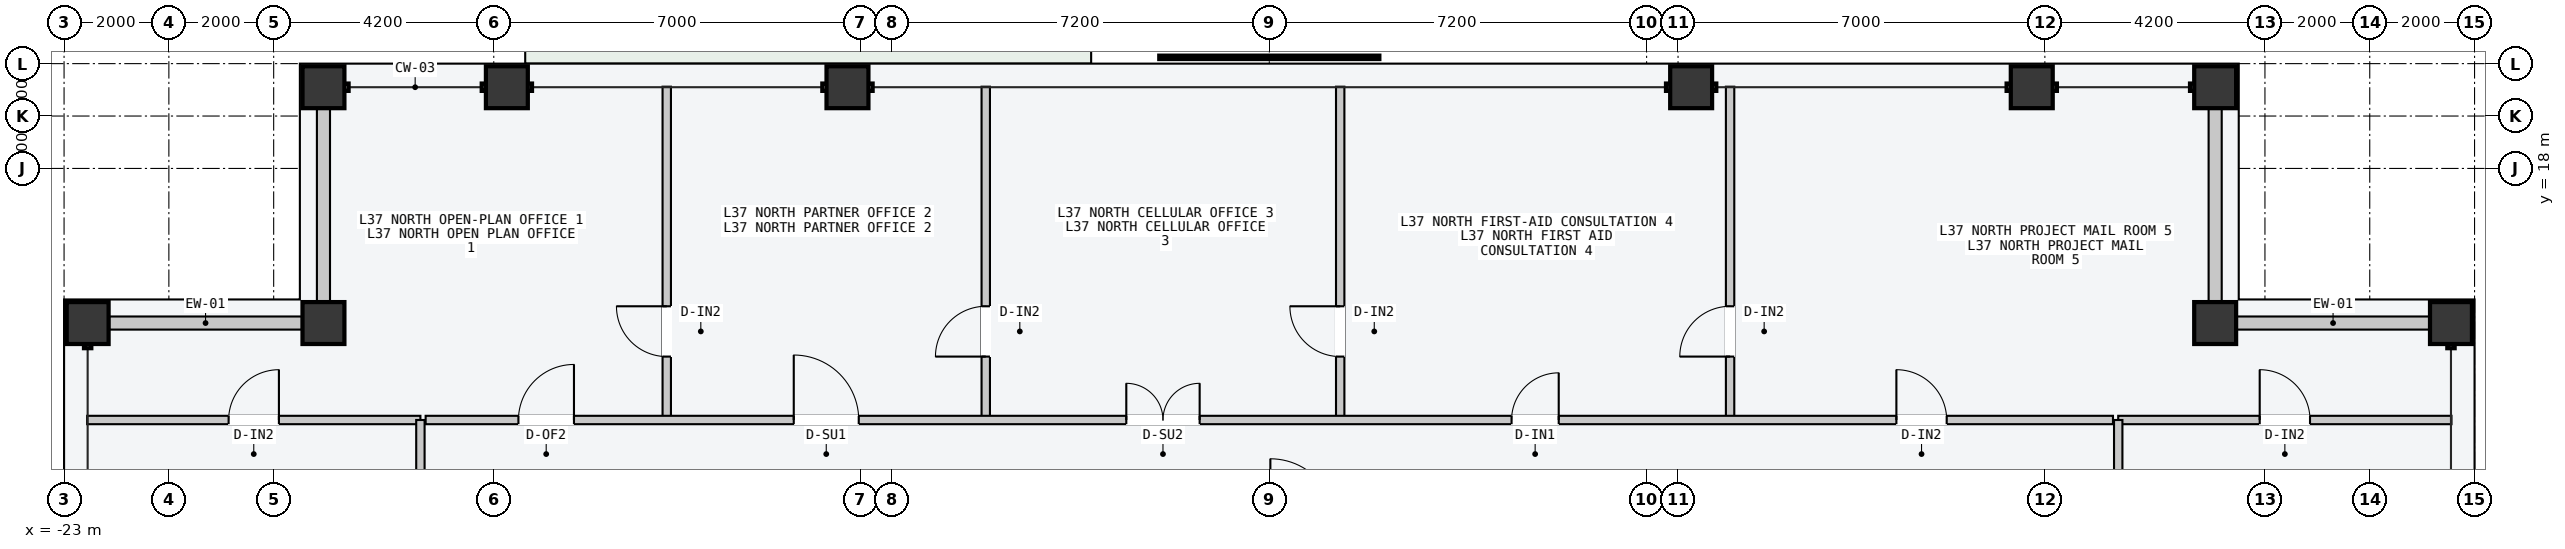
"""IFC4 building model, lengths in metres.
Left out: names, types, materials, properties, quantities, classifications, styles, units other than length and angle.
Written with IfcOpenShell. Run it as: python <this file> out.ifc"""

import sys

from ifc_helpers import new_model, si_unit, direction, frame, frame_2d, origin, origin_2d, place, context, subcontext, project, spatial, rectangle, hollow_rectangle, extrude, element, fill, save


model = new_model("IFC4")
c1 = context("Model", 3, precision=1e-05, world=origin(), true_north=direction((0.0, 1.0)))
c2 = subcontext(c1, "Body", "Model", "MODEL_VIEW")
j1 = project(units=[si_unit("LENGTHUNIT", "METRE"), si_unit("PLANEANGLEUNIT", "RADIAN")], contexts=[c1])
p1 = place(None, origin())
s1 = spatial("IfcSite", under=j1, at=p1, CompositionType="ELEMENT")
p2 = place(p1, origin())
s2 = spatial("IfcBuilding", under=s1, at=p2, CompositionType="ELEMENT")
p3 = place(p2, frame((0.0, 0.0, 142.2)))
s3 = spatial("IfcBuildingStorey", under=s2, at=p3, CompositionType="ELEMENT", Elevation=142.2)
for number, where, z_axis, x_axis in (
    (1, (-18.05, 19.55, 0.0), (0.0, 0.0, 1.0), (1.0, 0.0, 0.0)),
    (2, (-14.55, 19.55, 0.0), (0.0, 0.0, 1.0), (1.0, 0.0, 0.0)),
    (3, (-8.05, 19.55, 0.0), (0.0, 0.0, 1.0), (1.0, 0.0, 0.0)),
    (4, (8.05, 19.55, 0.0), (0.0, 0.0, 1.0), (1.0, 0.0, 0.0)),
    (5, (14.55, 19.55, 0.0), (0.0, 0.0, 1.0), (1.0, 0.0, 0.0)),
    (6, (18.05, 19.55, 0.0), (0.0, 0.0, 1.0), (1.0, 0.0, 0.0)),
    (7, (-22.55, 15.05, 0.0), (0.0, 0.0, 1.0), (0.0, 1.0, 0.0)),
    (8, (22.55, 15.05, 0.0), (0.0, 0.0, 1.0), (0.0, 1.0, 0.0)),
    (9, (-18.05, 15.05, 0.0), (0.0, 0.0, 1.0), (1.0, 0.0, 0.0)),
    (10, (18.05, 15.05, 0.0), (0.0, 0.0, 1.0), (1.0, 0.0, 0.0)),
):
    element("IfcColumn", number, at=place(p3, frame(where, z_axis=z_axis, x_axis=x_axis)), inside=s3, PredefinedType="COLUMN", context=c2, shape_type="SweptSolid", body=[
        extrude(hollow_rectangle(XDim=0.8, YDim=0.8, WallThickness=0.036, at=origin_2d()), origin(), (0.0, 0.0, 1.0), 3.6),
    ])
for number, where, z_axis, x_axis in (
    (11, (-22.14, 15.05, 0.0), (0.0, 0.0, 1.0), (1.0, 0.0, 0.0)),
    (12, (-18.05, 15.46, 0.0), (0.0, 0.0, 1.0), (0.0, 1.0, 0.0)),
    (13, (18.46, 15.05, 0.0), (0.0, 0.0, 1.0), (1.0, 0.0, 0.0)),
    (14, (18.05, 15.46, 0.0), (0.0, 0.0, 1.0), (0.0, 1.0, 0.0)),
):
    element("IfcWall", number, at=place(p3, frame(where, z_axis=z_axis, x_axis=x_axis)), inside=s3, PredefinedType="STANDARD", context=c2, shape_type="SweptSolid", body=[
        extrude(rectangle(XDim=3.68, YDim=0.25, at=frame_2d((1.84, 0.0))), origin(), (0.0, 0.0, 1.0), 2.75),
    ])
p4 = place(p3, frame((-11.499, 13.26, 0.0), z_axis=(0.0, 0.0, 1.0), x_axis=(0.0, 1.0, 0.0)))
e15 = element("IfcWall", 15, at=p4, inside=s3, PredefinedType="PARTITIONING", context=c2, shape_type="SweptSolid", body=[
    extrude(rectangle(XDim=6.3, YDim=0.16, at=frame_2d((3.15, 0.0))), origin(), (0.0, 0.0, 1.0), 3.4),
])
p5 = place(p4, frame((1.15, 0.0, 0.0)))
e16 = element("IfcOpeningElement", 16, at=p5, cuts=e15, PredefinedType="OPENING", context=c2, shape_type="SweptSolid", body=[
    extrude(rectangle(XDim=0.96, YDim=2.18, at=frame_2d((0.48, 1.09))), frame((0.0, 0.09, 0.0), z_axis=(0.0, -1.0, 0.0), x_axis=(1.0, 0.0, 0.0)), (0.0, 0.0, 1.0), 0.18),
])
p6 = place(p3, frame((-5.411, 13.26, 0.0), z_axis=(0.0, 0.0, 1.0), x_axis=(0.0, 1.0, 0.0)))
e17 = element("IfcWall", 17, at=p6, inside=s3, PredefinedType="PARTITIONING", context=c2, shape_type="SweptSolid", body=[
    extrude(rectangle(XDim=6.3, YDim=0.16, at=frame_2d((3.15, 0.0))), origin(), (0.0, 0.0, 1.0), 3.4),
])
p7 = place(p6, frame((1.15, 0.0, 0.0)))
e18 = element("IfcOpeningElement", 18, at=p7, cuts=e17, PredefinedType="OPENING", context=c2, shape_type="SweptSolid", body=[
    extrude(rectangle(XDim=0.96, YDim=2.18, at=frame_2d((0.48, 1.09))), frame((0.0, 0.09, 0.0), z_axis=(0.0, -1.0, 0.0), x_axis=(1.0, 0.0, 0.0)), (0.0, 0.0, 1.0), 0.18),
])
p8 = place(p3, frame((1.353, 13.26, 0.0), z_axis=(0.0, 0.0, 1.0), x_axis=(0.0, 1.0, 0.0)))
e19 = element("IfcWall", 19, at=p8, inside=s3, PredefinedType="PARTITIONING", context=c2, shape_type="SweptSolid", body=[
    extrude(rectangle(XDim=6.3, YDim=0.16, at=frame_2d((3.15, 0.0))), origin(), (0.0, 0.0, 1.0), 3.4),
])
p9 = place(p8, frame((1.15, 0.0, 0.0)))
e20 = element("IfcOpeningElement", 20, at=p9, cuts=e19, PredefinedType="OPENING", context=c2, shape_type="SweptSolid", body=[
    extrude(rectangle(XDim=0.96, YDim=2.18, at=frame_2d((0.48, 1.09))), frame((0.0, 0.09, 0.0), z_axis=(0.0, -1.0, 0.0), x_axis=(1.0, 0.0, 0.0)), (0.0, 0.0, 1.0), 0.18),
])
p10 = place(p3, frame((8.793, 13.26, 0.0), z_axis=(0.0, 0.0, 1.0), x_axis=(0.0, 1.0, 0.0)))
e21 = element("IfcWall", 21, at=p10, inside=s3, PredefinedType="PARTITIONING", context=c2, shape_type="SweptSolid", body=[
    extrude(rectangle(XDim=6.3, YDim=0.16, at=frame_2d((3.15, 0.0))), origin(), (0.0, 0.0, 1.0), 3.4),
])
p11 = place(p10, frame((1.15, 0.0, 0.0)))
e22 = element("IfcOpeningElement", 22, at=p11, cuts=e21, PredefinedType="OPENING", context=c2, shape_type="SweptSolid", body=[
    extrude(rectangle(XDim=0.96, YDim=2.18, at=frame_2d((0.48, 1.09))), frame((0.0, 0.09, 0.0), z_axis=(0.0, -1.0, 0.0), x_axis=(1.0, 0.0, 0.0)), (0.0, 0.0, 1.0), 0.18),
])
p12 = place(p3, frame((-16.1, 13.2, 0.0), z_axis=(0.0, 0.0, 1.0), x_axis=(1.0, 0.0, 0.0)))
e23 = element("IfcWall", 23, at=p12, inside=s3, PredefinedType="PARTITIONING", context=c2, shape_type="SweptSolid", body=[
    extrude(rectangle(XDim=32.2, YDim=0.16, at=frame_2d((16.1, 0.0))), origin(), (0.0, 0.0, 1.0), 3.4),
])
p13 = place(p12, frame((1.771, 0.0, 0.0)))
e24 = element("IfcOpeningElement", 24, at=p13, cuts=e23, PredefinedType="OPENING", context=c2, shape_type="SweptSolid", body=[
    extrude(rectangle(XDim=1.06, YDim=2.2, at=frame_2d((0.53, 1.1))), frame((0.0, 0.09, 0.0), z_axis=(0.0, -1.0, 0.0), x_axis=(1.0, 0.0, 0.0)), (0.0, 0.0, 1.0), 0.18),
])
p14 = place(p12, frame((7.025, 0.0, 0.0)))
e25 = element("IfcOpeningElement", 25, at=p14, cuts=e23, PredefinedType="OPENING", context=c2, shape_type="SweptSolid", body=[
    extrude(rectangle(XDim=1.24, YDim=2.24, at=frame_2d((0.62, 1.12))), frame((0.0, 0.09, 0.0), z_axis=(0.0, -1.0, 0.0), x_axis=(1.0, 0.0, 0.0)), (0.0, 0.0, 1.0), 0.18),
])
p15 = place(p12, frame((13.371, 0.0, 0.0)))
e26 = element("IfcOpeningElement", 26, at=p15, cuts=e23, PredefinedType="OPENING", context=c2, shape_type="SweptSolid", body=[
    extrude(rectangle(XDim=1.4, YDim=2.2, at=frame_2d((0.7, 1.1))), frame((0.0, 0.09, 0.0), z_axis=(0.0, -1.0, 0.0), x_axis=(1.0, 0.0, 0.0)), (0.0, 0.0, 1.0), 0.18),
])
p16 = place(p12, frame((20.723, 0.0, 0.0)))
e27 = element("IfcOpeningElement", 27, at=p16, cuts=e23, PredefinedType="OPENING", context=c2, shape_type="SweptSolid", body=[
    extrude(rectangle(XDim=0.9, YDim=2.15, at=frame_2d((0.45, 1.075))), frame((0.0, 0.09, 0.0), z_axis=(0.0, -1.0, 0.0), x_axis=(1.0, 0.0, 0.0)), (0.0, 0.0, 1.0), 0.18),
])
p17 = place(p12, frame((28.067, 0.0, 0.0)))
e28 = element("IfcOpeningElement", 28, at=p17, cuts=e23, PredefinedType="OPENING", context=c2, shape_type="SweptSolid", body=[
    extrude(rectangle(XDim=0.96, YDim=2.18, at=frame_2d((0.48, 1.09))), frame((0.0, 0.09, 0.0), z_axis=(0.0, -1.0, 0.0), x_axis=(1.0, 0.0, 0.0)), (0.0, 0.0, 1.0), 0.18),
])
p18 = place(p3, frame((-22.56, 13.2, 0.0), z_axis=(0.0, 0.0, 1.0), x_axis=(1.0, 0.0, 0.0)))
e29 = element("IfcWall", 29, at=p18, inside=s3, PredefinedType="PARTITIONING", context=c2, shape_type="SweptSolid", body=[
    extrude(rectangle(XDim=6.36, YDim=0.16, at=frame_2d((3.18, 0.0))), origin(), (0.0, 0.0, 1.0), 3.4),
])
p19 = place(p18, frame((2.7, 0.0, 0.0)))
e30 = element("IfcOpeningElement", 30, at=p19, cuts=e29, PredefinedType="OPENING", context=c2, shape_type="SweptSolid", body=[
    extrude(rectangle(XDim=0.96, YDim=2.18, at=frame_2d((0.48, 1.09))), frame((0.0, 0.09, 0.0), z_axis=(0.0, -1.0, 0.0), x_axis=(1.0, 0.0, 0.0)), (0.0, 0.0, 1.0), 0.18),
])
p20 = place(p3, frame((16.2, 13.2, 0.0), z_axis=(0.0, 0.0, 1.0), x_axis=(1.0, 0.0, 0.0)))
e31 = element("IfcWall", 31, at=p20, inside=s3, PredefinedType="PARTITIONING", context=c2, shape_type="SweptSolid", body=[
    extrude(rectangle(XDim=6.36, YDim=0.16, at=frame_2d((3.18, 0.0))), origin(), (0.0, 0.0, 1.0), 3.4),
])
p21 = place(p20, frame((2.7, 0.0, 0.0)))
e32 = element("IfcOpeningElement", 32, at=p21, cuts=e31, PredefinedType="OPENING", context=c2, shape_type="SweptSolid", body=[
    extrude(rectangle(XDim=0.96, YDim=2.18, at=frame_2d((0.48, 1.09))), frame((0.0, 0.09, 0.0), z_axis=(0.0, -1.0, 0.0), x_axis=(1.0, 0.0, 0.0)), (0.0, 0.0, 1.0), 0.18),
])
for number, where, z_axis, x_axis in (
    (33, (-16.2, 11.25, 0.0), (0.0, 0.0, 1.0), (0.0, 1.0, 0.0)),
    (34, (16.2, 11.25, 0.0), (0.0, 0.0, 1.0), (0.0, 1.0, 0.0)),
):
    element("IfcWall", number, at=place(p3, frame(where, z_axis=z_axis, x_axis=x_axis)), inside=s3, PredefinedType="PARTITIONING", context=c2, shape_type="SweptSolid", body=[
        extrude(rectangle(XDim=1.95, YDim=0.16, at=frame_2d((0.975, 0.0))), origin(), (0.0, 0.0, 1.0), 3.4),
    ])
p22 = place(p5, origin())
e35 = element("IfcDoor", 35, at=p22, inside=s3, OperationType="SINGLE_SWING_RIGHT", PredefinedType="DOOR", context=c2, shape_type="SweptSolid", body=[
    extrude(rectangle(XDim=0.96, YDim=2.18, at=frame_2d((0.48, 1.09))), frame((0.0, 0.025, 0.0), z_axis=(0.0, -1.0, 0.0), x_axis=(1.0, 0.0, 0.0)), (0.0, 0.0, 1.0), 0.05),
])
fill(e16, e35)
p23 = place(p7, origin())
e36 = element("IfcDoor", 36, at=p23, inside=s3, OperationType="SINGLE_SWING_LEFT", PredefinedType="DOOR", context=c2, shape_type="SweptSolid", body=[
    extrude(rectangle(XDim=0.96, YDim=2.18, at=frame_2d((0.48, 1.09))), frame((0.0, 0.025, 0.0), z_axis=(0.0, -1.0, 0.0), x_axis=(1.0, 0.0, 0.0)), (0.0, 0.0, 1.0), 0.05),
])
fill(e18, e36)
p24 = place(p9, origin())
e37 = element("IfcDoor", 37, at=p24, inside=s3, OperationType="SINGLE_SWING_RIGHT", PredefinedType="DOOR", context=c2, shape_type="SweptSolid", body=[
    extrude(rectangle(XDim=0.96, YDim=2.18, at=frame_2d((0.48, 1.09))), frame((0.0, 0.025, 0.0), z_axis=(0.0, -1.0, 0.0), x_axis=(1.0, 0.0, 0.0)), (0.0, 0.0, 1.0), 0.05),
])
fill(e20, e37)
p25 = place(p11, origin())
e38 = element("IfcDoor", 38, at=p25, inside=s3, OperationType="SINGLE_SWING_LEFT", PredefinedType="DOOR", context=c2, shape_type="SweptSolid", body=[
    extrude(rectangle(XDim=0.96, YDim=2.18, at=frame_2d((0.48, 1.09))), frame((0.0, 0.025, 0.0), z_axis=(0.0, -1.0, 0.0), x_axis=(1.0, 0.0, 0.0)), (0.0, 0.0, 1.0), 0.05),
])
fill(e22, e38)
p26 = place(p13, origin())
e39 = element("IfcDoor", 39, at=p26, inside=s3, OperationType="SINGLE_SWING_RIGHT", PredefinedType="DOOR", context=c2, shape_type="SweptSolid", body=[
    extrude(rectangle(XDim=1.06, YDim=2.2, at=frame_2d((0.53, 1.1))), frame((0.0, 0.025, 0.0), z_axis=(0.0, -1.0, 0.0), x_axis=(1.0, 0.0, 0.0)), (0.0, 0.0, 1.0), 0.05),
])
fill(e24, e39)
p27 = place(p14, origin())
e40 = element("IfcDoor", 40, at=p27, inside=s3, OperationType="SINGLE_SWING_LEFT", PredefinedType="DOOR", context=c2, shape_type="SweptSolid", body=[
    extrude(rectangle(XDim=1.24, YDim=2.24, at=frame_2d((0.62, 1.12))), frame((0.0, 0.025, 0.0), z_axis=(0.0, -1.0, 0.0), x_axis=(1.0, 0.0, 0.0)), (0.0, 0.0, 1.0), 0.05),
])
fill(e25, e40)
p28 = place(p15, origin())
e41 = element("IfcDoor", 41, at=p28, inside=s3, OperationType="DOUBLE_DOOR_SINGLE_SWING", PredefinedType="DOOR", context=c2, shape_type="SweptSolid", body=[
    extrude(rectangle(XDim=1.4, YDim=2.2, at=frame_2d((0.7, 1.1))), frame((0.0, 0.025, 0.0), z_axis=(0.0, -1.0, 0.0), x_axis=(1.0, 0.0, 0.0)), (0.0, 0.0, 1.0), 0.05),
])
fill(e26, e41)
p29 = place(p16, origin())
e42 = element("IfcDoor", 42, at=p29, inside=s3, OperationType="SINGLE_SWING_RIGHT", PredefinedType="DOOR", context=c2, shape_type="SweptSolid", body=[
    extrude(rectangle(XDim=0.9, YDim=2.15, at=frame_2d((0.45, 1.075))), frame((0.0, 0.025, 0.0), z_axis=(0.0, -1.0, 0.0), x_axis=(1.0, 0.0, 0.0)), (0.0, 0.0, 1.0), 0.05),
])
fill(e27, e42)
p30 = place(p17, origin())
e43 = element("IfcDoor", 43, at=p30, inside=s3, OperationType="SINGLE_SWING_LEFT", PredefinedType="DOOR", context=c2, shape_type="SweptSolid", body=[
    extrude(rectangle(XDim=0.96, YDim=2.18, at=frame_2d((0.48, 1.09))), frame((0.0, 0.025, 0.0), z_axis=(0.0, -1.0, 0.0), x_axis=(1.0, 0.0, 0.0)), (0.0, 0.0, 1.0), 0.05),
])
fill(e28, e43)
p31 = place(p19, origin())
e44 = element("IfcDoor", 44, at=p31, inside=s3, OperationType="SINGLE_SWING_RIGHT", PredefinedType="DOOR", context=c2, shape_type="SweptSolid", body=[
    extrude(rectangle(XDim=0.96, YDim=2.18, at=frame_2d((0.48, 1.09))), frame((0.0, 0.025, 0.0), z_axis=(0.0, -1.0, 0.0), x_axis=(1.0, 0.0, 0.0)), (0.0, 0.0, 1.0), 0.05),
])
fill(e30, e44)
p32 = place(p21, origin())
e45 = element("IfcDoor", 45, at=p32, inside=s3, OperationType="SINGLE_SWING_LEFT", PredefinedType="DOOR", context=c2, shape_type="SweptSolid", body=[
    extrude(rectangle(XDim=0.96, YDim=2.18, at=frame_2d((0.48, 1.09))), frame((0.0, 0.025, 0.0), z_axis=(0.0, -1.0, 0.0), x_axis=(1.0, 0.0, 0.0)), (0.0, 0.0, 1.0), 0.05),
])
fill(e32, e45)
save(model, sys.argv[1])
